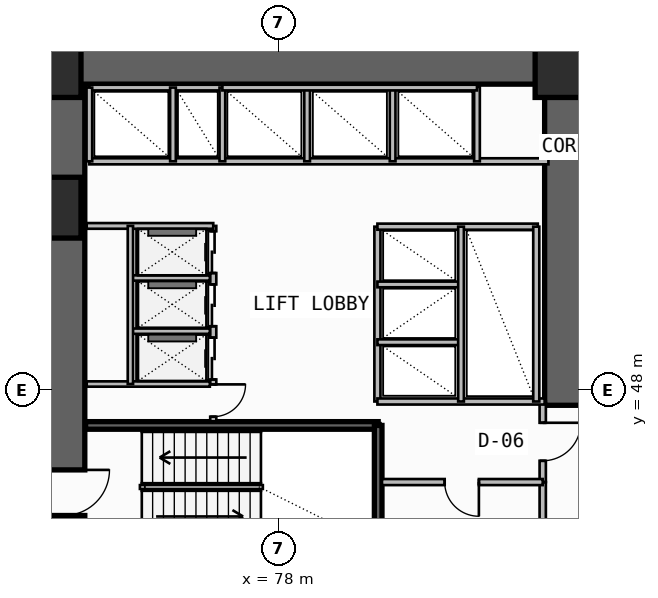
"""IFC4 building model, lengths in metres.
Left out: names, types, materials, properties, quantities, classifications, styles, units other than length and angle.
Written with IfcOpenShell. Run it as: python <this file> out.ifc"""

import sys

from ifc_helpers import new_model, si_unit, direction, frame, frame_2d, origin, origin_2d, place, context, subcontext, project, spatial, rectangle, extrude, element, fill, save


model = new_model("IFC4")
c1 = context("Model", 3, precision=1e-05, world=origin(), true_north=direction((0.0, 1.0)))
c2 = subcontext(c1, "Body", "Model", "MODEL_VIEW")
j1 = project(units=[si_unit("LENGTHUNIT", "METRE"), si_unit("PLANEANGLEUNIT", "RADIAN")], contexts=[c1])
p1 = place(None, origin())
s1 = spatial("IfcSite", under=j1, at=p1, CompositionType="ELEMENT")
p2 = place(p1, origin())
s2 = spatial("IfcBuilding", under=s1, at=p2, CompositionType="ELEMENT")
p3 = place(p2, frame((0.0, 0.0, 13.2)))
s3 = spatial("IfcBuildingStorey", under=s2, at=p3, CompositionType="ELEMENT", Elevation=13.2)
p4 = place(p3, frame((72.35, 43.35, -0.32), z_axis=(0.0, 0.0, 1.0), x_axis=(0.0, 1.0, 0.0)))
e1 = element("IfcWall", 1, at=p4, inside=s3, PredefinedType="SHEAR", context=c2, shape_type="SweptSolid", body=[
    extrude(rectangle(XDim=12.7, YDim=1.1, at=frame_2d((6.35, 0.0))), origin(), (0.0, 0.0, 1.0), 4.2),
])
p5 = place(p4, frame((1.35, 0.0, 0.32)))
e2 = element("IfcOpeningElement", 2, at=p5, cuts=e1, PredefinedType="OPENING", context=c2, shape_type="SweptSolid", body=[
    extrude(rectangle(XDim=1.2, YDim=2.2, at=frame_2d((0.6, 1.1))), frame((0.0, 0.56, 0.0), z_axis=(0.0, -1.0, 0.0), x_axis=(1.0, 0.0, 0.0)), (0.0, 0.0, 1.0), 1.12),
])
p6 = place(p3, frame((71.8, 56.6, -0.32), z_axis=(0.0, 0.0, 1.0), x_axis=(1.0, 0.0, 0.0)))
e3 = element("IfcWall", 3, at=p6, inside=s3, PredefinedType="SHEAR", context=c2, shape_type="SweptSolid", body=[
    extrude(rectangle(XDim=14.3, YDim=1.1, at=frame_2d((7.15, 0.0))), origin(), (0.0, 0.0, 1.0), 4.2),
])
p7 = place(p3, frame((85.55, 47.6, -0.32), z_axis=(0.0, 0.0, 1.0), x_axis=(0.0, 1.0, 0.0)))
e4 = element("IfcWall", 4, at=p7, inside=s3, PredefinedType="SHEAR", context=c2, shape_type="SweptSolid", body=[
    extrude(rectangle(XDim=8.45, YDim=1.1, at=frame_2d((4.225, 0.0))), origin(), (0.0, 0.0, 1.0), 4.2),
])
for number, where, z_axis, x_axis in (
    (5, (72.0, 52.8, 0.0), (0.0, 0.0, 1.0), (1.0, 0.0, 0.0)),
    (6, (72.0, 56.5, 0.0), (0.0, 0.0, 1.0), (1.0, 0.0, 0.0)),
    (7, (85.55, 56.5, 0.0), (0.0, 0.0, 1.0), (1.0, 0.0, 0.0)),
):
    element("IfcColumn", number, at=place(p3, frame(where, z_axis=z_axis, x_axis=x_axis)), inside=s3, PredefinedType="COLUMN", context=c2, shape_type="SweptSolid", body=[
        extrude(rectangle(XDim=1.6, YDim=1.6, at=origin_2d()), origin(), (0.0, 0.0, 1.0), 4.2),
    ])
p8 = place(p3, frame((72.92, 47.07, -0.32), z_axis=(0.0, 0.0, 1.0), x_axis=(1.0, 0.0, 0.0)))
e8 = element("IfcWall", 8, at=p8, inside=s3, PredefinedType="SOLIDWALL", context=c2, shape_type="SweptSolid", body=[
    extrude(rectangle(XDim=7.7, YDim=0.2, at=frame_2d((3.85, 0.0))), origin(), (0.0, 0.0, 1.0), 4.2),
])
p9 = place(p3, frame((80.62, 43.83, -0.32), z_axis=(0.0, 0.0, 1.0), x_axis=(0.0, 1.0, 0.0)))
e9 = element("IfcWall", 9, at=p9, inside=s3, PredefinedType="SOLIDWALL", context=c2, shape_type="SweptSolid", body=[
    extrude(rectangle(XDim=3.24, YDim=0.2, at=frame_2d((1.62, 0.0))), origin(), (0.0, 0.0, 1.0), 4.2),
])
p10 = place(p3, frame((84.95, 43.68, 0.0), z_axis=(0.0, 0.0, 1.0), x_axis=(0.0, 1.0, 0.0)))
e10 = element("IfcWall", 10, at=p10, inside=s3, PredefinedType="PLUMBINGWALL", context=c2, shape_type="SweptSolid", body=[
    extrude(rectangle(XDim=1.9, YDim=0.165, at=frame_2d((0.95, 0.0))), origin(), (0.0, 0.0, 1.0), 3.88),
])
p11 = place(p3, frame((84.95, 45.58, 0.0), z_axis=(0.0, 0.0, 1.0), x_axis=(0.0, 1.0, 0.0)))
e11 = element("IfcWall", 11, at=p11, inside=s3, PredefinedType="PARTITIONING", context=c2, shape_type="SweptSolid", body=[
    extrude(rectangle(XDim=2.12, YDim=0.165, at=frame_2d((1.06, 0.0))), origin(), (0.0, 0.0, 1.0), 3.88),
])
p12 = place(p11, frame((0.56, 0.0, 0.0)))
e12 = element("IfcOpeningElement", 12, at=p12, cuts=e11, PredefinedType="OPENING", context=c2, shape_type="SweptSolid", body=[
    extrude(rectangle(XDim=1.0, YDim=2.2, at=frame_2d((0.5, 1.1))), frame((0.0, 0.093, 0.0), z_axis=(0.0, -1.0, 0.0), x_axis=(1.0, 0.0, 0.0)), (0.0, 0.0, 1.0), 0.185),
])
p13 = place(p3, frame((80.72, 45.58, 0.0), z_axis=(0.0, 0.0, 1.0), x_axis=(1.0, 0.0, 0.0)))
e13 = element("IfcWall", 13, at=p13, inside=s3, PredefinedType="PLUMBINGWALL", context=c2, shape_type="SweptSolid", body=[
    extrude(rectangle(XDim=4.23, YDim=0.16, at=frame_2d((2.115, 0.0))), origin(), (0.0, 0.0, 1.0), 3.88),
])
p14 = place(p13, frame((1.65, 0.0, 0.0)))
e14 = element("IfcOpeningElement", 14, at=p14, cuts=e13, PredefinedType="OPENING", context=c2, shape_type="SweptSolid", body=[
    extrude(rectangle(XDim=0.9, YDim=2.1, at=frame_2d((0.45, 1.05))), frame((0.0, 0.09, 0.0), z_axis=(0.0, -1.0, 0.0), x_axis=(1.0, 0.0, 0.0)), (0.0, 0.0, 1.0), 0.18),
])
p15 = place(p3, frame((76.28, 47.18, 0.0), z_axis=(0.0, 0.0, 1.0), x_axis=(0.0, 1.0, 0.0)))
e15 = element("IfcWall", 15, at=p15, inside=s3, PredefinedType="SOLIDWALL", context=c2, shape_type="SweptSolid", body=[
    extrude(rectangle(XDim=5.14, YDim=0.16, at=frame_2d((2.57, 0.0))), origin(), (0.0, 0.0, 1.0), 3.88),
])
p16 = place(p15, frame((1.1, 0.0, 0.0)))
e16 = element("IfcOpeningElement", 16, at=p16, cuts=e15, PredefinedType="OPENING", context=c2, shape_type="SweptSolid", body=[
    extrude(rectangle(XDim=1.1, YDim=2.25, at=frame_2d((0.55, 1.125))), frame((0.0, 0.09, 0.0), z_axis=(0.0, -1.0, 0.0), x_axis=(1.0, 0.0, 0.0)), (0.0, 0.0, 1.0), 0.18),
])
p17 = place(p15, frame((2.5, 0.0, 0.0)))
e17 = element("IfcOpeningElement", 17, at=p17, cuts=e15, PredefinedType="OPENING", context=c2, shape_type="SweptSolid", body=[
    extrude(rectangle(XDim=1.1, YDim=2.25, at=frame_2d((0.55, 1.125))), frame((0.0, 0.09, 0.0), z_axis=(0.0, -1.0, 0.0), x_axis=(1.0, 0.0, 0.0)), (0.0, 0.0, 1.0), 0.18),
])
p18 = place(p15, frame((3.9, 0.0, 0.0)))
e18 = element("IfcOpeningElement", 18, at=p18, cuts=e15, PredefinedType="OPENING", context=c2, shape_type="SweptSolid", body=[
    extrude(rectangle(XDim=1.1, YDim=2.25, at=frame_2d((0.55, 1.125))), frame((0.0, 0.09, 0.0), z_axis=(0.0, -1.0, 0.0), x_axis=(1.0, 0.0, 0.0)), (0.0, 0.0, 1.0), 0.18),
])
p19 = place(p15, frame((0.12, 0.0, 0.0)))
e19 = element("IfcOpeningElement", 19, at=p19, cuts=e15, PredefinedType="OPENING", context=c2, shape_type="SweptSolid", body=[
    extrude(rectangle(XDim=0.85, YDim=2.05, at=frame_2d((0.425, 1.025))), frame((0.0, 0.09, 0.0), z_axis=(0.0, -1.0, 0.0), x_axis=(1.0, 0.0, 0.0)), (0.0, 0.0, 1.0), 0.18),
])
p20 = place(p3, frame((72.95, 52.32, 0.0), z_axis=(0.0, 0.0, 1.0), x_axis=(1.0, 0.0, 0.0)))
e20 = element("IfcWall", 20, at=p20, inside=s3, PredefinedType="SOLIDWALL", context=c2, shape_type="SweptSolid", body=[
    extrude(rectangle(XDim=3.33, YDim=0.15, at=frame_2d((1.665, 0.0))), origin(), (0.0, 0.0, 1.0), 3.88),
])
p21 = place(p3, frame((72.95, 48.16, 0.0), z_axis=(0.0, 0.0, 1.0), x_axis=(1.0, 0.0, 0.0)))
e21 = element("IfcWall", 21, at=p21, inside=s3, PredefinedType="PLUMBINGWALL", context=c2, shape_type="SweptSolid", body=[
    extrude(rectangle(XDim=3.24, YDim=0.14, at=frame_2d((1.62, 0.0))), origin(), (0.0, 0.0, 1.0), 3.88),
])
for number, where, z_axis, x_axis in (
    (22, (74.15, 49.55, 0.0), (0.0, 0.0, 1.0), (1.0, 0.0, 0.0)),
    (23, (74.15, 50.95, 0.0), (0.0, 0.0, 1.0), (1.0, 0.0, 0.0)),
):
    element("IfcWall", number, at=place(p3, frame(where, z_axis=z_axis, x_axis=x_axis)), inside=s3, PredefinedType="PLUMBINGWALL", context=c2, shape_type="SweptSolid", body=[
        extrude(rectangle(XDim=2.04, YDim=0.14, at=frame_2d((1.02, 0.0))), origin(), (0.0, 0.0, 1.0), 3.88),
    ])
p22 = place(p3, frame((74.1, 48.16, 0.0), z_axis=(0.0, 0.0, 1.0), x_axis=(0.0, 1.0, 0.0)))
e24 = element("IfcWall", 24, at=p22, inside=s3, PredefinedType="PLUMBINGWALL", context=c2, shape_type="SweptSolid", body=[
    extrude(rectangle(XDim=4.16, YDim=0.14, at=frame_2d((2.08, 0.0))), origin(), (0.0, 0.0, 1.0), 3.88),
])
p23 = place(p3, frame((80.6, 47.7, 0.0), z_axis=(0.0, 0.0, 1.0), x_axis=(0.0, 1.0, 0.0)))
e25 = element("IfcWall", 25, at=p23, inside=s3, PredefinedType="SOLIDWALL", context=c2, shape_type="SweptSolid", body=[
    extrude(rectangle(XDim=4.6, YDim=0.16, at=frame_2d((2.3, 0.0))), origin(), (0.0, 0.0, 1.0), 3.88),
])
p24 = place(p3, frame((80.6, 47.7, 0.0), z_axis=(0.0, 0.0, 1.0), x_axis=(1.0, 0.0, 0.0)))
e26 = element("IfcWall", 26, at=p24, inside=s3, PredefinedType="SOLIDWALL", context=c2, shape_type="SweptSolid", body=[
    extrude(rectangle(XDim=4.4, YDim=0.16, at=frame_2d((2.2, 0.0))), origin(), (0.0, 0.0, 1.0), 3.88),
])
p25 = place(p3, frame((80.6, 52.3, 0.0), z_axis=(0.0, 0.0, 1.0), x_axis=(1.0, 0.0, 0.0)))
e27 = element("IfcWall", 27, at=p25, inside=s3, PredefinedType="SOLIDWALL", context=c2, shape_type="SweptSolid", body=[
    extrude(rectangle(XDim=4.22, YDim=0.16, at=frame_2d((2.11, 0.0))), origin(), (0.0, 0.0, 1.0), 3.88),
])
for number, where, z_axis, x_axis in (
    (28, (80.6, 49.26, 0.0), (0.0, 0.0, 1.0), (1.0, 0.0, 0.0)),
    (29, (80.6, 50.78, 0.0), (0.0, 0.0, 1.0), (1.0, 0.0, 0.0)),
):
    element("IfcWall", number, at=place(p3, frame(where, z_axis=z_axis, x_axis=x_axis)), inside=s3, PredefinedType="PLUMBINGWALL", context=c2, shape_type="SweptSolid", body=[
        extrude(rectangle(XDim=2.2, YDim=0.15, at=frame_2d((1.1, 0.0))), origin(), (0.0, 0.0, 1.0), 3.88),
    ])
p26 = place(p3, frame((82.8, 47.7, 0.0), z_axis=(0.0, 0.0, 1.0), x_axis=(0.0, 1.0, 0.0)))
e30 = element("IfcWall", 30, at=p26, inside=s3, PredefinedType="PLUMBINGWALL", context=c2, shape_type="SweptSolid", body=[
    extrude(rectangle(XDim=4.6, YDim=0.15, at=frame_2d((2.3, 0.0))), origin(), (0.0, 0.0, 1.0), 3.88),
])
p27 = place(p3, frame((84.78, 47.7, 0.0), z_axis=(0.0, 0.0, 1.0), x_axis=(0.0, 1.0, 0.0)))
e31 = element("IfcWall", 31, at=p27, inside=s3, PredefinedType="SOLIDWALL", context=c2, shape_type="SweptSolid", body=[
    extrude(rectangle(XDim=4.6, YDim=0.16, at=frame_2d((2.3, 0.0))), origin(), (0.0, 0.0, 1.0), 3.88),
])
p28 = place(p3, frame((73.02, 54.02, 0.0), z_axis=(0.0, 0.0, 1.0), x_axis=(1.0, 0.0, 0.0)))
e32 = element("IfcWall", 32, at=p28, inside=s3, PredefinedType="SOLIDWALL", context=c2, shape_type="SweptSolid", body=[
    extrude(rectangle(XDim=12.08, YDim=0.16, at=frame_2d((6.04, 0.0))), origin(), (0.0, 0.0, 1.0), 3.88),
])
p29 = place(p3, frame((73.02, 55.96, 0.0), z_axis=(0.0, 0.0, 1.0), x_axis=(1.0, 0.0, 0.0)))
e33 = element("IfcWall", 33, at=p29, inside=s3, PredefinedType="SOLIDWALL", context=c2, shape_type="SweptSolid", body=[
    extrude(rectangle(XDim=3.5, YDim=0.15, at=frame_2d((1.75, 0.0))), origin(), (0.0, 0.0, 1.0), 3.88),
])
p30 = place(p3, frame((73.02, 54.02, 0.0), z_axis=(0.0, 0.0, 1.0), x_axis=(0.0, 1.0, 0.0)))
e34 = element("IfcWall", 34, at=p30, inside=s3, PredefinedType="PLUMBINGWALL", context=c2, shape_type="SweptSolid", body=[
    extrude(rectangle(XDim=1.94, YDim=0.15, at=frame_2d((0.97, 0.0))), origin(), (0.0, 0.0, 1.0), 3.88),
])
p31 = place(p3, frame((76.52, 54.02, 0.0), z_axis=(0.0, 0.0, 1.0), x_axis=(0.0, 1.0, 0.0)))
e35 = element("IfcWall", 35, at=p31, inside=s3, PredefinedType="SOLIDWALL", context=c2, shape_type="SweptSolid", body=[
    extrude(rectangle(XDim=1.94, YDim=0.15, at=frame_2d((0.97, 0.0))), origin(), (0.0, 0.0, 1.0), 3.88),
])
p32 = place(p3, frame((75.22, 54.02, 0.0), z_axis=(0.0, 0.0, 1.0), x_axis=(0.0, 1.0, 0.0)))
e36 = element("IfcWall", 36, at=p32, inside=s3, PredefinedType="PLUMBINGWALL", context=c2, shape_type="SweptSolid", body=[
    extrude(rectangle(XDim=1.94, YDim=0.15, at=frame_2d((0.97, 0.0))), origin(), (0.0, 0.0, 1.0), 3.88),
])
for number, where, z_axis, x_axis in (
    (37, (78.75, 54.02, 0.0), (0.0, 0.0, 1.0), (0.0, 1.0, 0.0)),
    (38, (81.0, 54.02, 0.0), (0.0, 0.0, 1.0), (0.0, 1.0, 0.0)),
):
    element("IfcWall", number, at=place(p3, frame(where, z_axis=z_axis, x_axis=x_axis)), inside=s3, PredefinedType="PLUMBINGWALL", context=c2, shape_type="SweptSolid", body=[
        extrude(rectangle(XDim=1.96, YDim=0.15, at=frame_2d((0.98, 0.0))), origin(), (0.0, 0.0, 1.0), 3.88),
    ])
p33 = place(p3, frame((83.22, 54.02, 0.0), z_axis=(0.0, 0.0, 1.0), x_axis=(0.0, 1.0, 0.0)))
e39 = element("IfcWall", 39, at=p33, inside=s3, PredefinedType="SOLIDWALL", context=c2, shape_type="SweptSolid", body=[
    extrude(rectangle(XDim=1.96, YDim=0.15, at=frame_2d((0.98, 0.0))), origin(), (0.0, 0.0, 1.0), 3.88),
])
p34 = place(p3, frame((76.52, 55.96, 0.0), z_axis=(0.0, 0.0, 1.0), x_axis=(1.0, 0.0, 0.0)))
e40 = element("IfcWall", 40, at=p34, inside=s3, PredefinedType="SOLIDWALL", context=c2, shape_type="SweptSolid", body=[
    extrude(rectangle(XDim=6.7, YDim=0.15, at=frame_2d((3.35, 0.0))), origin(), (0.0, 0.0, 1.0), 3.88),
])
p35 = place(p5, frame((1.2, 0.0, 0.0), z_axis=(0.0, 0.0, 1.0), x_axis=(-1.0, 0.0, 0.0)))
e41 = element("IfcDoor", 41, at=p35, inside=s3, OperationType="SINGLE_SWING_LEFT", PredefinedType="USERDEFINED", context=c2, shape_type="SweptSolid", body=[
    extrude(rectangle(XDim=1.2, YDim=2.2, at=frame_2d((0.6, 1.1))), frame((0.0, 0.025, 0.0), z_axis=(0.0, -1.0, 0.0), x_axis=(1.0, 0.0, 0.0)), (0.0, 0.0, 1.0), 0.05),
])
fill(e2, e41)
p36 = place(p12, frame((1.0, 0.0, 0.0), z_axis=(0.0, 0.0, 1.0), x_axis=(-1.0, 0.0, 0.0)))
e42 = element("IfcDoor", 42, at=p36, inside=s3, OperationType="SINGLE_SWING_LEFT", PredefinedType="DOOR", context=c2, shape_type="SweptSolid", body=[
    extrude(rectangle(XDim=1.0, YDim=2.2, at=frame_2d((0.5, 1.1))), frame((0.0, 0.025, 0.0), z_axis=(0.0, -1.0, 0.0), x_axis=(1.0, 0.0, 0.0)), (0.0, 0.0, 1.0), 0.05),
])
fill(e12, e42)
p37 = place(p14, frame((0.9, 0.0, 0.0), z_axis=(0.0, 0.0, 1.0), x_axis=(-1.0, 0.0, 0.0)))
e43 = element("IfcDoor", 43, at=p37, inside=s3, OperationType="SINGLE_SWING_LEFT", PredefinedType="DOOR", context=c2, shape_type="SweptSolid", body=[
    extrude(rectangle(XDim=0.9, YDim=2.1, at=frame_2d((0.45, 1.05))), frame((0.0, 0.025, 0.0), z_axis=(0.0, -1.0, 0.0), x_axis=(1.0, 0.0, 0.0)), (0.0, 0.0, 1.0), 0.05),
])
fill(e14, e43)
p38 = place(p16, origin())
e44 = element("IfcDoor", 44, at=p38, inside=s3, OperationType="DOUBLE_DOOR_SLIDING", PredefinedType="DOOR", context=c2, shape_type="SweptSolid", body=[
    extrude(rectangle(XDim=1.1, YDim=2.25, at=frame_2d((0.55, 1.125))), frame((0.0, 0.025, 0.0), z_axis=(0.0, -1.0, 0.0), x_axis=(1.0, 0.0, 0.0)), (0.0, 0.0, 1.0), 0.05),
])
fill(e16, e44)
p39 = place(p17, origin())
e45 = element("IfcDoor", 45, at=p39, inside=s3, OperationType="DOUBLE_DOOR_SLIDING", PredefinedType="DOOR", context=c2, shape_type="SweptSolid", body=[
    extrude(rectangle(XDim=1.1, YDim=2.25, at=frame_2d((0.55, 1.125))), frame((0.0, 0.025, 0.0), z_axis=(0.0, -1.0, 0.0), x_axis=(1.0, 0.0, 0.0)), (0.0, 0.0, 1.0), 0.05),
])
fill(e17, e45)
p40 = place(p18, origin())
e46 = element("IfcDoor", 46, at=p40, inside=s3, OperationType="DOUBLE_DOOR_SLIDING", PredefinedType="DOOR", context=c2, shape_type="SweptSolid", body=[
    extrude(rectangle(XDim=1.1, YDim=2.25, at=frame_2d((0.55, 1.125))), frame((0.0, 0.025, 0.0), z_axis=(0.0, -1.0, 0.0), x_axis=(1.0, 0.0, 0.0)), (0.0, 0.0, 1.0), 0.05),
])
fill(e18, e46)
p41 = place(p19, frame((0.85, 0.0, 0.0), z_axis=(0.0, 0.0, 1.0), x_axis=(-1.0, 0.0, 0.0)))
e47 = element("IfcDoor", 47, at=p41, inside=s3, OperationType="SINGLE_SWING_LEFT", PredefinedType="DOOR", context=c2, shape_type="SweptSolid", body=[
    extrude(rectangle(XDim=0.85, YDim=2.05, at=frame_2d((0.425, 1.025))), frame((0.0, 0.025, 0.0), z_axis=(0.0, -1.0, 0.0), x_axis=(1.0, 0.0, 0.0)), (0.0, 0.0, 1.0), 0.05),
])
fill(e19, e47)
save(model, sys.argv[1])
